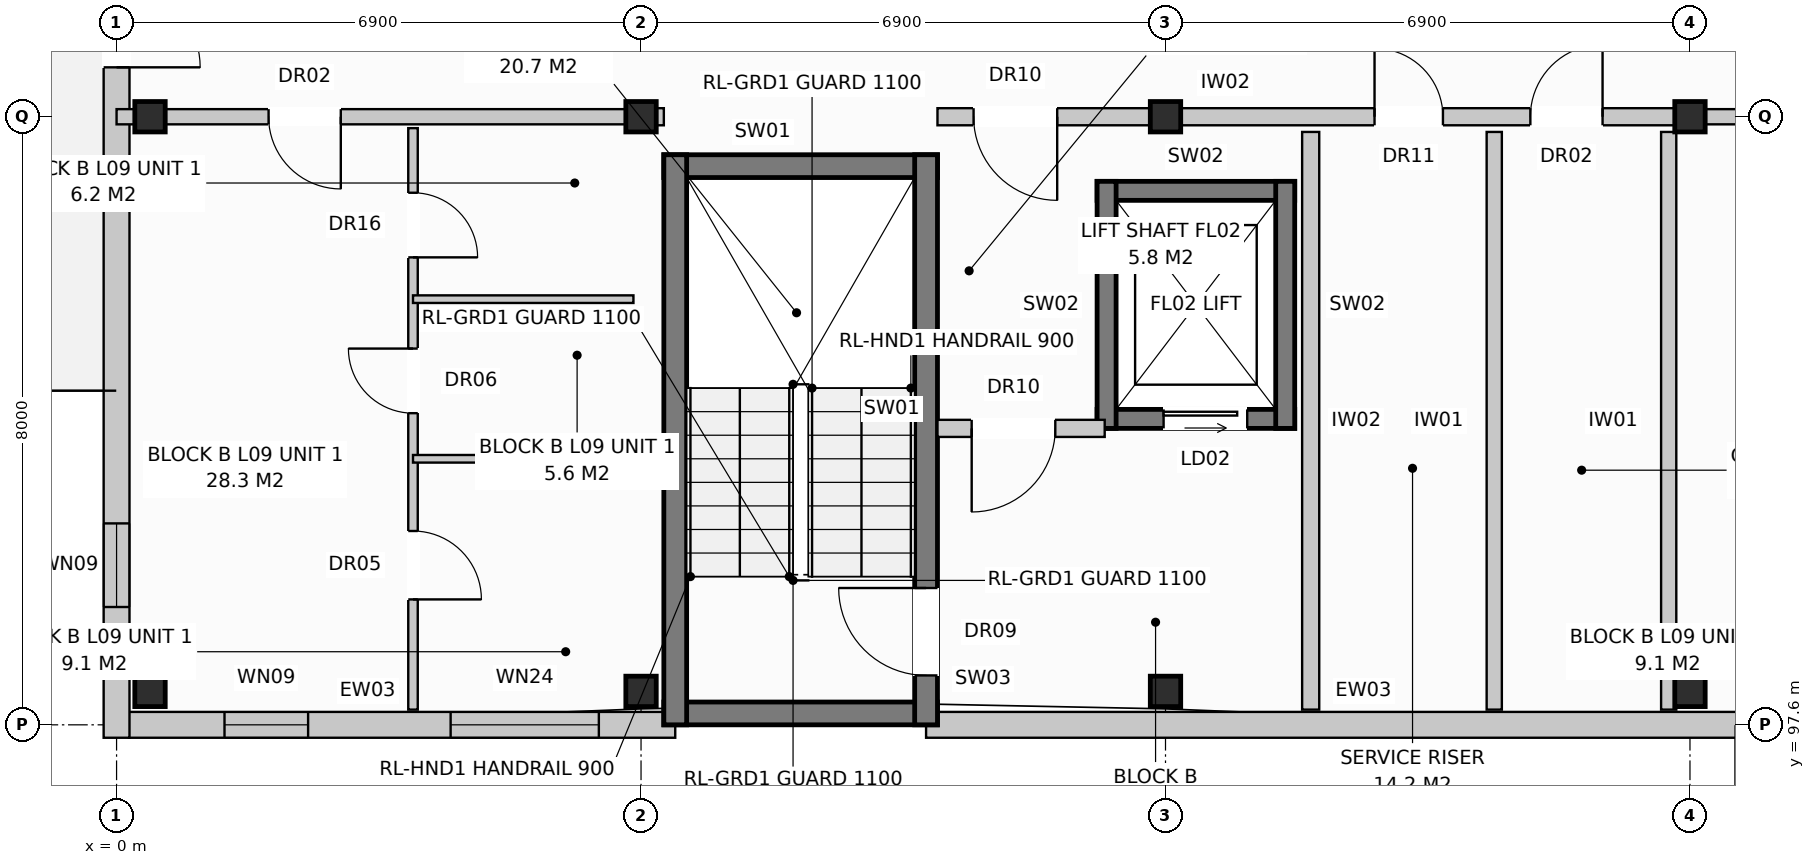
"""IFC4 building model, lengths in metres.
Left out: names, types, materials, properties, quantities, classifications, styles, units other than length and angle.
Written with IfcOpenShell. Run it as: python <this file> out.ifc"""

import sys

from ifc_helpers import new_model, si_unit, direction, frame, frame_2d, origin, origin_with_axes, origin_2d, place, context, subcontext, project, spatial, rectangle, extrude, element, fill, save


model = new_model("IFC4")
c1 = context("Model", 3, precision=1e-05, world=origin(), true_north=direction((0.0, 1.0)))
c2 = subcontext(c1, "Body", "Model", "MODEL_VIEW")
j1 = project(units=[si_unit("LENGTHUNIT", "METRE"), si_unit("PLANEANGLEUNIT", "RADIAN")], contexts=[c1])
p1 = place(None, origin())
s1 = spatial("IfcSite", under=j1, at=p1, CompositionType="ELEMENT")
p2 = place(p1, origin())
s2 = spatial("IfcBuilding", under=s1, at=p2, CompositionType="ELEMENT")
p3 = place(p2, frame((0.0, 0.0, 30.4)))
s3 = spatial("IfcBuildingStorey", under=s2, at=p3, CompositionType="ELEMENT", Elevation=30.4)
for number, where, z_axis, x_axis in (
    (1, (0.44, 98.04, 0.0), (0.0, 0.0, 1.0), (1.0, 0.0, 0.0)),
    (2, (0.44, 105.6, 0.0), (0.0, 0.0, 1.0), (1.0, 0.0, 0.0)),
    (3, (6.9, 98.04, 0.0), (0.0, 0.0, 1.0), (1.0, 0.0, 0.0)),
    (4, (6.9, 105.6, 0.0), (0.0, 0.0, 1.0), (1.0, 0.0, 0.0)),
    (5, (13.8, 98.04, 0.0), (0.0, 0.0, 1.0), (1.0, 0.0, 0.0)),
    (6, (13.8, 105.6, 0.0), (0.0, 0.0, 1.0), (1.0, 0.0, 0.0)),
    (7, (20.7, 98.04, 0.0), (0.0, 0.0, 1.0), (1.0, 0.0, 0.0)),
    (8, (20.7, 105.6, 0.0), (0.0, 0.0, 1.0), (1.0, 0.0, 0.0)),
):
    element("IfcColumn", number, at=place(p3, frame(where, z_axis=z_axis, x_axis=x_axis)), inside=s3, PredefinedType="COLUMN", context=c2, shape_type="SweptSolid", body=[
        extrude(rectangle(XDim=0.4, YDim=0.4, at=origin_2d()), origin(), (0.0, 0.0, 1.0), 3.2),
    ])
p4 = place(p3, frame((0.16, 97.6, 0.0), z_axis=(0.0, 0.0, 1.0), x_axis=(1.0, 0.0, 0.0)))
e9 = element("IfcWall", 9, at=p4, inside=s3, PredefinedType="STANDARD", context=c2, shape_type="SweptSolid", body=[
    extrude(rectangle(XDim=7.19, YDim=0.34, at=frame_2d((3.595, 0.0))), origin(), (0.0, 0.0, 1.0), 2.96),
])
p5 = place(p4, frame((1.26, 0.0, 0.72)))
e10 = element("IfcOpeningElement", 10, at=p5, cuts=e9, PredefinedType="OPENING", context=c2, shape_type="SweptSolid", body=[
    extrude(rectangle(XDim=1.1, YDim=1.5, at=frame_2d((0.55, 0.75))), frame((0.0, 0.182, 0.0), z_axis=(0.0, -1.0, 0.0), x_axis=(1.0, 0.0, 0.0)), (0.0, 0.0, 1.0), 0.364),
])
p6 = place(p4, frame((4.235, 0.0, 0.8)))
e11 = element("IfcOpeningElement", 11, at=p6, cuts=e9, PredefinedType="OPENING", context=c2, shape_type="SweptSolid", body=[
    extrude(rectangle(XDim=1.95, YDim=1.65, at=frame_2d((0.975, 0.825))), frame((0.0, 0.182, 0.0), z_axis=(0.0, -1.0, 0.0), x_axis=(1.0, 0.0, 0.0)), (0.0, 0.0, 1.0), 0.364),
])
p7 = place(p3, frame((10.65, 97.6, 0.0), z_axis=(0.0, 0.0, 1.0), x_axis=(1.0, 0.0, 0.0)))
e12 = element("IfcWall", 12, at=p7, inside=s3, PredefinedType="STANDARD", context=c2, shape_type="SweptSolid", body=[
    extrude(rectangle(XDim=17.4, YDim=0.34, at=frame_2d((8.7, 0.0))), origin(), (0.0, 0.0, 1.0), 2.96),
])
p8 = place(p7, frame((11.82, 0.0, 0.0)))
e13 = element("IfcOpeningElement", 13, at=p8, cuts=e12, PredefinedType="OPENING", context=c2, shape_type="SweptSolid", body=[
    extrude(rectangle(XDim=1.05, YDim=2.12, at=frame_2d((0.525, 1.06))), frame((0.0, 0.182, 0.0), z_axis=(0.0, -1.0, 0.0), x_axis=(1.0, 0.0, 0.0)), (0.0, 0.0, 1.0), 0.364),
])
p9 = place(p7, frame((14.87, 0.0, 0.72)))
e14 = element("IfcOpeningElement", 14, at=p9, cuts=e12, PredefinedType="OPENING", context=c2, shape_type="SweptSolid", body=[
    extrude(rectangle(XDim=1.1, YDim=1.5, at=frame_2d((0.55, 0.75))), frame((0.0, 0.182, 0.0), z_axis=(0.0, -1.0, 0.0), x_axis=(1.0, 0.0, 0.0)), (0.0, 0.0, 1.0), 0.364),
])
p10 = place(p3, frame((0.0, 97.43, 0.0), z_axis=(0.0, 0.0, 1.0), x_axis=(0.0, 1.0, 0.0)))
e15 = element("IfcWall", 15, at=p10, inside=s3, PredefinedType="STANDARD", context=c2, shape_type="SweptSolid", body=[
    extrude(rectangle(XDim=18.74, YDim=0.34, at=frame_2d((9.37, 0.0))), origin(), (0.0, 0.0, 1.0), 2.96),
])
p11 = place(p10, frame((8.82, 0.0, 0.0)))
e16 = element("IfcOpeningElement", 16, at=p11, cuts=e15, PredefinedType="OPENING", context=c2, shape_type="SweptSolid", body=[
    extrude(rectangle(XDim=1.1, YDim=2.1, at=frame_2d((0.55, 1.05))), frame((0.0, 0.182, 0.0), z_axis=(0.0, -1.0, 0.0), x_axis=(1.0, 0.0, 0.0)), (0.0, 0.0, 1.0), 0.364),
])
p12 = place(p10, frame((1.72, 0.0, 0.72)))
e17 = element("IfcOpeningElement", 17, at=p12, cuts=e15, PredefinedType="OPENING", context=c2, shape_type="SweptSolid", body=[
    extrude(rectangle(XDim=1.1, YDim=1.5, at=frame_2d((0.55, 0.75))), frame((0.0, 0.182, 0.0), z_axis=(0.0, -1.0, 0.0), x_axis=(1.0, 0.0, 0.0)), (0.0, 0.0, 1.0), 0.364),
])
p13 = place(p10, frame((15.92, 0.0, 0.72)))
e18 = element("IfcOpeningElement", 18, at=p13, cuts=e15, PredefinedType="OPENING", context=c2, shape_type="SweptSolid", body=[
    extrude(rectangle(XDim=1.1, YDim=1.5, at=frame_2d((0.55, 0.75))), frame((0.0, 0.182, 0.0), z_axis=(0.0, -1.0, 0.0), x_axis=(1.0, 0.0, 0.0)), (0.0, 0.0, 1.0), 0.364),
])
for number, where, z_axis, x_axis in (
    (19, (7.2, 97.75, 0.0), (0.0, 0.0, 1.0), (1.0, 0.0, 0.0)),
    (20, (7.2, 104.95, 0.0), (0.0, 0.0, 1.0), (1.0, 0.0, 0.0)),
):
    element("IfcWall", number, at=place(p3, frame(where, z_axis=z_axis, x_axis=x_axis)), inside=s3, PredefinedType="SHEAR", context=c2, shape_type="SweptSolid", body=[
        extrude(rectangle(XDim=3.6, YDim=0.3, at=frame_2d((1.8, 0.0))), origin(), (0.0, 0.0, 1.0), 2.96),
    ])
p14 = place(p3, frame((7.35, 97.6, 0.0), z_axis=(0.0, 0.0, 1.0), x_axis=(0.0, 1.0, 0.0)))
e21 = element("IfcWall", 21, at=p14, inside=s3, PredefinedType="SHEAR", context=c2, shape_type="SweptSolid", body=[
    extrude(rectangle(XDim=7.5, YDim=0.3, at=frame_2d((3.75, 0.0))), origin(), (0.0, 0.0, 1.0), 2.96),
])
p15 = place(p3, frame((10.65, 97.6, 0.0), z_axis=(0.0, 0.0, 1.0), x_axis=(0.0, 1.0, 0.0)))
e22 = element("IfcWall", 22, at=p15, inside=s3, PredefinedType="SHEAR", context=c2, shape_type="SweptSolid", body=[
    extrude(rectangle(XDim=7.5, YDim=0.3, at=frame_2d((3.75, 0.0))), origin(), (0.0, 0.0, 1.0), 2.96),
])
p16 = place(p15, frame((0.65, 0.0, 0.0)))
e23 = element("IfcOpeningElement", 23, at=p16, cuts=e22, PredefinedType="OPENING", context=c2, shape_type="SweptSolid", body=[
    extrude(rectangle(XDim=1.15, YDim=2.15, at=frame_2d((0.575, 1.075))), frame((0.0, 0.162, 0.0), z_axis=(0.0, -1.0, 0.0), x_axis=(1.0, 0.0, 0.0)), (0.0, 0.0, 1.0), 0.324),
])
p17 = place(p3, frame((12.9, 101.625, 0.0), z_axis=(0.0, 0.0, 1.0), x_axis=(1.0, 0.0, 0.0)))
e24 = element("IfcWall", 24, at=p17, inside=s3, PredefinedType="SHEAR", context=c2, shape_type="SweptSolid", body=[
    extrude(rectangle(XDim=2.6, YDim=0.25, at=frame_2d((1.3, 0.0))), origin(), (0.0, 0.0, 1.0), 2.96),
])
p18 = place(p17, frame((0.875, 0.0, 0.0)))
e25 = element("IfcOpeningElement", 25, at=p18, cuts=e24, PredefinedType="OPENING", context=c2, shape_type="SweptSolid", body=[
    extrude(rectangle(XDim=1.1, YDim=2.1, at=frame_2d((0.55, 1.05))), frame((0.0, 0.137, 0.0), z_axis=(0.0, -1.0, 0.0), x_axis=(1.0, 0.0, 0.0)), (0.0, 0.0, 1.0), 0.274),
])
p19 = place(p3, frame((12.9, 104.625, 0.0), z_axis=(0.0, 0.0, 1.0), x_axis=(1.0, 0.0, 0.0)))
e26 = element("IfcWall", 26, at=p19, inside=s3, PredefinedType="SHEAR", context=c2, shape_type="SweptSolid", body=[
    extrude(rectangle(XDim=2.6, YDim=0.25, at=frame_2d((1.3, 0.0))), origin(), (0.0, 0.0, 1.0), 2.96),
])
for number, where, z_axis, x_axis in (
    (27, (13.025, 101.5, 0.0), (0.0, 0.0, 1.0), (0.0, 1.0, 0.0)),
    (28, (15.375, 101.5, 0.0), (0.0, 0.0, 1.0), (0.0, 1.0, 0.0)),
):
    element("IfcWall", number, at=place(p3, frame(where, z_axis=z_axis, x_axis=x_axis)), inside=s3, PredefinedType="SHEAR", context=c2, shape_type="SweptSolid", body=[
        extrude(rectangle(XDim=3.25, YDim=0.25, at=frame_2d((1.625, 0.0))), origin(), (0.0, 0.0, 1.0), 2.96),
    ])
p20 = place(p3, frame((15.71, 97.8, 0.0), z_axis=(0.0, 0.0, 1.0), x_axis=(0.0, 1.0, 0.0)))
e29 = element("IfcWall", 29, at=p20, inside=s3, PredefinedType="PARTITIONING", context=c2, shape_type="SweptSolid", body=[
    extrude(rectangle(XDim=7.6, YDim=0.225, at=frame_2d((3.8, 0.0))), origin(), (0.0, 0.0, 1.0), 2.96),
])
p21 = place(p3, frame((10.8, 101.5, 0.0), z_axis=(0.0, 0.0, 1.0), x_axis=(1.0, 0.0, 0.0)))
e30 = element("IfcWall", 30, at=p21, inside=s3, PredefinedType="PARTITIONING", context=c2, shape_type="SweptSolid", body=[
    extrude(rectangle(XDim=2.2, YDim=0.225, at=frame_2d((1.1, 0.0))), origin(), (0.0, 0.0, 1.0), 2.96),
])
p22 = place(p21, frame((0.45, 0.0, 0.0)))
e31 = element("IfcOpeningElement", 31, at=p22, cuts=e30, PredefinedType="OPENING", context=c2, shape_type="SweptSolid", body=[
    extrude(rectangle(XDim=1.1, YDim=2.15, at=frame_2d((0.55, 1.075))), frame((0.0, 0.125, 0.0), z_axis=(0.0, -1.0, 0.0), x_axis=(1.0, 0.0, 0.0)), (0.0, 0.0, 1.0), 0.249),
])
p23 = place(p3, frame((6.9, 105.6, 0.0), z_axis=(0.0, 0.0, 1.0), x_axis=(1.0, 0.0, 0.0)))
e32 = element("IfcWall", 32, at=p23, inside=s3, PredefinedType="PARTITIONING", context=c2, shape_type="SweptSolid", body=[
    extrude(rectangle(XDim=0.3, YDim=0.225, at=frame_2d((0.15, 0.0))), origin(), (0.0, 0.0, 1.0), 2.96),
])
for number, where, z_axis, x_axis in (
    (33, (18.125, 97.8, 0.0), (0.0, 0.0, 1.0), (0.0, 1.0, 0.0)),
    (34, (20.42, 97.8, 0.0), (0.0, 0.0, 1.0), (0.0, 1.0, 0.0)),
):
    element("IfcWall", number, at=place(p3, frame(where, z_axis=z_axis, x_axis=x_axis)), inside=s3, PredefinedType="PARTITIONING", context=c2, shape_type="SweptSolid", body=[
        extrude(rectangle(XDim=7.6, YDim=0.2, at=frame_2d((3.8, 0.0))), origin(), (0.0, 0.0, 1.0), 2.96),
    ])
p24 = place(p3, frame((10.8, 105.6, 0.0), z_axis=(0.0, 0.0, 1.0), x_axis=(1.0, 0.0, 0.0)))
e35 = element("IfcWall", 35, at=p24, inside=s3, PredefinedType="PARTITIONING", context=c2, shape_type="SweptSolid", body=[
    extrude(rectangle(XDim=9.9, YDim=0.225, at=frame_2d((4.95, 0.0))), origin(), (0.0, 0.0, 1.0), 2.4),
])
p25 = place(p24, frame((0.475, 0.0, 0.0)))
e36 = element("IfcOpeningElement", 36, at=p25, cuts=e35, PredefinedType="OPENING", context=c2, shape_type="SweptSolid", body=[
    extrude(rectangle(XDim=1.1, YDim=2.15, at=frame_2d((0.55, 1.075))), frame((0.0, 0.125, 0.0), z_axis=(0.0, -1.0, 0.0), x_axis=(1.0, 0.0, 0.0)), (0.0, 0.0, 1.0), 0.249),
])
p26 = place(p24, frame((5.75, 0.0, 0.0)))
e37 = element("IfcOpeningElement", 37, at=p26, cuts=e35, PredefinedType="OPENING", context=c2, shape_type="SweptSolid", body=[
    extrude(rectangle(XDim=0.9, YDim=2.1, at=frame_2d((0.45, 1.05))), frame((0.0, 0.125, 0.0), z_axis=(0.0, -1.0, 0.0), x_axis=(1.0, 0.0, 0.0)), (0.0, 0.0, 1.0), 0.249),
])
p27 = place(p24, frame((7.8, 0.0, 0.0)))
e38 = element("IfcOpeningElement", 38, at=p27, cuts=e35, PredefinedType="OPENING", context=c2, shape_type="SweptSolid", body=[
    extrude(rectangle(XDim=0.95, YDim=2.15, at=frame_2d((0.475, 1.075))), frame((0.0, 0.125, 0.0), z_axis=(0.0, -1.0, 0.0), x_axis=(1.0, 0.0, 0.0)), (0.0, 0.0, 1.0), 0.249),
])
p28 = place(p3, frame((0.0, 105.6, 0.0), z_axis=(0.0, 0.0, 1.0), x_axis=(1.0, 0.0, 0.0)))
e39 = element("IfcWall", 39, at=p28, inside=s3, PredefinedType="PARTITIONING", context=c2, shape_type="SweptSolid", body=[
    extrude(rectangle(XDim=6.9, YDim=0.2, at=frame_2d((3.45, 0.0))), origin(), (0.0, 0.0, 1.0), 2.4),
])
p29 = place(p28, frame((2.0, 0.0, 0.0)))
e40 = element("IfcOpeningElement", 40, at=p29, cuts=e39, PredefinedType="OPENING", context=c2, shape_type="SweptSolid", body=[
    extrude(rectangle(XDim=0.95, YDim=2.15, at=frame_2d((0.475, 1.075))), frame((0.0, 0.112, 0.0), z_axis=(0.0, -1.0, 0.0), x_axis=(1.0, 0.0, 0.0)), (0.0, 0.0, 1.0), 0.224),
])
p30 = place(p3, frame((3.9, 105.45, 0.0), z_axis=(0.0, 0.0, 1.0), x_axis=(0.0, -1.0, 0.0)))
e41 = element("IfcWall", 41, at=p30, inside=s3, PredefinedType="PARTITIONING", context=c2, shape_type="SweptSolid", body=[
    extrude(rectangle(XDim=7.65, YDim=0.125, at=frame_2d((3.825, 0.0))), origin(), (0.0, 0.0, 1.0), 2.96),
])
p31 = place(p30, frame((0.85, 0.0, 0.0)))
e42 = element("IfcOpeningElement", 42, at=p31, cuts=e41, PredefinedType="OPENING", context=c2, shape_type="SweptSolid", body=[
    extrude(rectangle(XDim=0.85, YDim=2.1, at=frame_2d((0.425, 1.05))), frame((0.0, 0.074, 0.0), z_axis=(0.0, -1.0, 0.0), x_axis=(1.0, 0.0, 0.0)), (0.0, 0.0, 1.0), 0.149),
])
p32 = place(p30, frame((2.9, 0.0, 0.0)))
e43 = element("IfcOpeningElement", 43, at=p32, cuts=e41, PredefinedType="OPENING", context=c2, shape_type="SweptSolid", body=[
    extrude(rectangle(XDim=0.85, YDim=2.05, at=frame_2d((0.425, 1.025))), frame((0.0, 0.074, 0.0), z_axis=(0.0, -1.0, 0.0), x_axis=(1.0, 0.0, 0.0)), (0.0, 0.0, 1.0), 0.149),
])
p33 = place(p30, frame((5.3, 0.0, 0.0)))
e44 = element("IfcOpeningElement", 44, at=p33, cuts=e41, PredefinedType="OPENING", context=c2, shape_type="SweptSolid", body=[
    extrude(rectangle(XDim=0.9, YDim=2.1, at=frame_2d((0.45, 1.05))), frame((0.0, 0.074, 0.0), z_axis=(0.0, -1.0, 0.0), x_axis=(1.0, 0.0, 0.0)), (0.0, 0.0, 1.0), 0.149),
])
for number, where, z_axis, x_axis in (
    (45, (3.9, 103.2, 0.0), (0.0, 0.0, 1.0), (1.0, 0.0, 0.0)),
    (46, (3.9, 101.1, 0.0), (0.0, 0.0, 1.0), (1.0, 0.0, 0.0)),
):
    element("IfcWall", number, at=place(p3, frame(where, z_axis=z_axis, x_axis=x_axis)), inside=s3, PredefinedType="PARTITIONING", context=c2, shape_type="SweptSolid", body=[
        extrude(rectangle(XDim=2.9, YDim=0.1, at=frame_2d((1.45, 0.0))), origin(), (0.0, 0.0, 1.0), 2.96),
    ])
p34 = place(p3, frame((20.7, 105.6, 0.0), z_axis=(0.0, 0.0, 1.0), x_axis=(1.0, 0.0, 0.0)))
e47 = element("IfcWall", 47, at=p34, inside=s3, PredefinedType="PARTITIONING", context=c2, shape_type="SweptSolid", body=[
    extrude(rectangle(XDim=6.9, YDim=0.2, at=frame_2d((3.45, 0.0))), origin(), (0.0, 0.0, 1.0), 2.4),
])
p35 = place(p34, frame((2.0, 0.0, 0.0)))
e48 = element("IfcOpeningElement", 48, at=p35, cuts=e47, PredefinedType="OPENING", context=c2, shape_type="SweptSolid", body=[
    extrude(rectangle(XDim=0.95, YDim=2.15, at=frame_2d((0.475, 1.075))), frame((0.0, 0.112, 0.0), z_axis=(0.0, -1.0, 0.0), x_axis=(1.0, 0.0, 0.0)), (0.0, 0.0, 1.0), 0.224),
])
p36 = place(p5, origin_with_axes())
e49 = element("IfcWindow", 49, at=p36, inside=s3, PartitioningType="SINGLE_PANEL", PredefinedType="WINDOW", context=c2, shape_type="SweptSolid", body=[
    extrude(rectangle(XDim=1.1, YDim=1.5, at=frame_2d((0.55, 0.75))), frame((0.0, 0.03, 0.0), z_axis=(0.0, -1.0, 0.0), x_axis=(1.0, 0.0, 0.0)), (0.0, 0.0, 1.0), 0.06),
])
fill(e10, e49)
p37 = place(p6, origin_with_axes())
e50 = element("IfcWindow", 50, at=p37, inside=s3, PartitioningType="SINGLE_PANEL", PredefinedType="WINDOW", context=c2, shape_type="SweptSolid", body=[
    extrude(rectangle(XDim=1.95, YDim=1.65, at=frame_2d((0.975, 0.825))), frame((0.0, 0.03, 0.0), z_axis=(0.0, -1.0, 0.0), x_axis=(1.0, 0.0, 0.0)), (0.0, 0.0, 1.0), 0.06),
])
fill(e11, e50)
p38 = place(p11, frame((1.1, 0.0, 0.0), z_axis=(0.0, 0.0, 1.0), x_axis=(-1.0, 0.0, 0.0)))
e51 = element("IfcDoor", 51, at=p38, inside=s3, OperationType="SINGLE_SWING_LEFT", PredefinedType="DOOR", context=c2, shape_type="SweptSolid", body=[
    extrude(rectangle(XDim=1.1, YDim=2.1, at=frame_2d((0.55, 1.05))), frame((0.0, 0.025, 0.0), z_axis=(0.0, -1.0, 0.0), x_axis=(1.0, 0.0, 0.0)), (0.0, 0.0, 1.0), 0.05),
])
fill(e16, e51)
p39 = place(p12, origin_with_axes())
e52 = element("IfcWindow", 52, at=p39, inside=s3, PartitioningType="SINGLE_PANEL", PredefinedType="WINDOW", context=c2, shape_type="SweptSolid", body=[
    extrude(rectangle(XDim=1.1, YDim=1.5, at=frame_2d((0.55, 0.75))), frame((0.0, 0.03, 0.0), z_axis=(0.0, -1.0, 0.0), x_axis=(1.0, 0.0, 0.0)), (0.0, 0.0, 1.0), 0.06),
])
fill(e17, e52)
p40 = place(p16, origin_with_axes())
e53 = element("IfcDoor", 53, at=p40, inside=s3, OperationType="SINGLE_SWING_RIGHT", PredefinedType="DOOR", context=c2, shape_type="SweptSolid", body=[
    extrude(rectangle(XDim=1.15, YDim=2.15, at=frame_2d((0.575, 1.075))), frame((0.0, 0.025, 0.0), z_axis=(0.0, -1.0, 0.0), x_axis=(1.0, 0.0, 0.0)), (0.0, 0.0, 1.0), 0.05),
])
fill(e23, e53)
p41 = place(p18, origin_with_axes())
e54 = element("IfcDoor", 54, at=p41, inside=s3, OperationType="SLIDING_TO_LEFT", PredefinedType="DOOR", context=c2, shape_type="SweptSolid", body=[
    extrude(rectangle(XDim=1.1, YDim=2.1, at=frame_2d((0.55, 1.05))), frame((0.0, 0.025, 0.0), z_axis=(0.0, -1.0, 0.0), x_axis=(1.0, 0.0, 0.0)), (0.0, 0.0, 1.0), 0.05),
])
fill(e25, e54)
p42 = place(p22, frame((1.1, 0.0, 0.0), z_axis=(0.0, 0.0, 1.0), x_axis=(-1.0, 0.0, 0.0)))
e55 = element("IfcDoor", 55, at=p42, inside=s3, OperationType="SINGLE_SWING_LEFT", PredefinedType="DOOR", context=c2, shape_type="SweptSolid", body=[
    extrude(rectangle(XDim=1.1, YDim=2.15, at=frame_2d((0.55, 1.075))), frame((0.0, 0.025, 0.0), z_axis=(0.0, -1.0, 0.0), x_axis=(1.0, 0.0, 0.0)), (0.0, 0.0, 1.0), 0.05),
])
fill(e31, e55)
p43 = place(p25, frame((1.1, 0.0, 0.0), z_axis=(0.0, 0.0, 1.0), x_axis=(-1.0, 0.0, 0.0)))
e56 = element("IfcDoor", 56, at=p43, inside=s3, OperationType="SINGLE_SWING_RIGHT", PredefinedType="DOOR", context=c2, shape_type="SweptSolid", body=[
    extrude(rectangle(XDim=1.1, YDim=2.15, at=frame_2d((0.55, 1.075))), frame((0.0, 0.025, 0.0), z_axis=(0.0, -1.0, 0.0), x_axis=(1.0, 0.0, 0.0)), (0.0, 0.0, 1.0), 0.05),
])
fill(e36, e56)
p44 = place(p26, origin_with_axes())
e57 = element("IfcDoor", 57, at=p44, inside=s3, OperationType="SINGLE_SWING_LEFT", PredefinedType="DOOR", context=c2, shape_type="SweptSolid", body=[
    extrude(rectangle(XDim=0.9, YDim=2.1, at=frame_2d((0.45, 1.05))), frame((0.0, 0.025, 0.0), z_axis=(0.0, -1.0, 0.0), x_axis=(1.0, 0.0, 0.0)), (0.0, 0.0, 1.0), 0.05),
])
fill(e37, e57)
p45 = place(p27, origin_with_axes())
e58 = element("IfcDoor", 58, at=p45, inside=s3, OperationType="SINGLE_SWING_RIGHT", PredefinedType="DOOR", context=c2, shape_type="SweptSolid", body=[
    extrude(rectangle(XDim=0.95, YDim=2.15, at=frame_2d((0.475, 1.075))), frame((0.0, 0.025, 0.0), z_axis=(0.0, -1.0, 0.0), x_axis=(1.0, 0.0, 0.0)), (0.0, 0.0, 1.0), 0.05),
])
fill(e38, e58)
p46 = place(p29, frame((0.95, 0.0, 0.0), z_axis=(0.0, 0.0, 1.0), x_axis=(-1.0, 0.0, 0.0)))
e59 = element("IfcDoor", 59, at=p46, inside=s3, OperationType="SINGLE_SWING_RIGHT", PredefinedType="DOOR", context=c2, shape_type="SweptSolid", body=[
    extrude(rectangle(XDim=0.95, YDim=2.15, at=frame_2d((0.475, 1.075))), frame((0.0, 0.025, 0.0), z_axis=(0.0, -1.0, 0.0), x_axis=(1.0, 0.0, 0.0)), (0.0, 0.0, 1.0), 0.05),
])
fill(e40, e59)
p47 = place(p31, origin_with_axes())
e60 = element("IfcDoor", 60, at=p47, inside=s3, OperationType="SINGLE_SWING_RIGHT", PredefinedType="DOOR", context=c2, shape_type="SweptSolid", body=[
    extrude(rectangle(XDim=0.85, YDim=2.1, at=frame_2d((0.425, 1.05))), frame((0.0, 0.025, 0.0), z_axis=(0.0, -1.0, 0.0), x_axis=(1.0, 0.0, 0.0)), (0.0, 0.0, 1.0), 0.05),
])
fill(e42, e60)
p48 = place(p32, frame((0.85, 0.0, 0.0), z_axis=(0.0, 0.0, 1.0), x_axis=(-1.0, 0.0, 0.0)))
e61 = element("IfcDoor", 61, at=p48, inside=s3, OperationType="SINGLE_SWING_LEFT", PredefinedType="DOOR", context=c2, shape_type="SweptSolid", body=[
    extrude(rectangle(XDim=0.85, YDim=2.05, at=frame_2d((0.425, 1.025))), frame((0.0, 0.025, 0.0), z_axis=(0.0, -1.0, 0.0), x_axis=(1.0, 0.0, 0.0)), (0.0, 0.0, 1.0), 0.05),
])
fill(e43, e61)
p49 = place(p33, origin_with_axes())
e62 = element("IfcDoor", 62, at=p49, inside=s3, OperationType="SINGLE_SWING_RIGHT", PredefinedType="DOOR", context=c2, shape_type="SweptSolid", body=[
    extrude(rectangle(XDim=0.9, YDim=2.1, at=frame_2d((0.45, 1.05))), frame((0.0, 0.025, 0.0), z_axis=(0.0, -1.0, 0.0), x_axis=(1.0, 0.0, 0.0)), (0.0, 0.0, 1.0), 0.05),
])
fill(e44, e62)
save(model, sys.argv[1])
